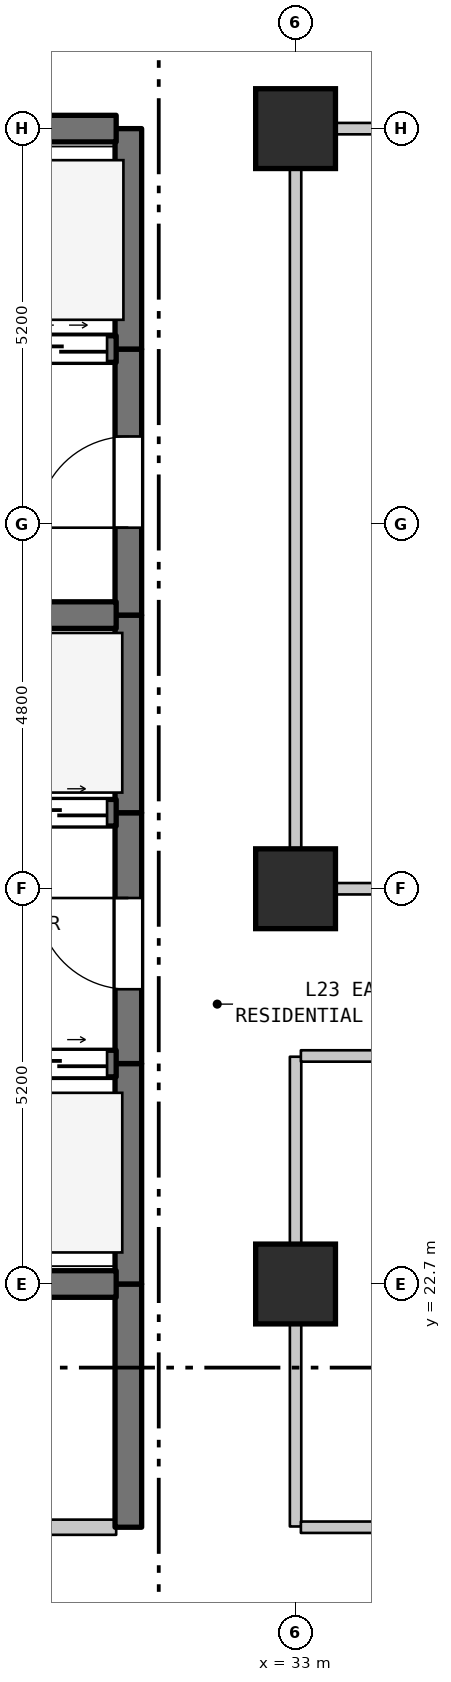
"""IFC4 building model, lengths in metres.
Left out: names, types, materials, properties, quantities, classifications, styles, units other than length and angle.
Written with IfcOpenShell. Run it as: python <this file> out.ifc"""

import sys

from ifc_helpers import new_model, si_unit, direction, frame, frame_2d, origin, origin_2d, place, context, subcontext, project, spatial, rectangle, extrude, element, fill, save


model = new_model("IFC4")
c1 = context("Model", 3, precision=1e-05, world=origin(), true_north=direction((0.0, 1.0)))
c2 = subcontext(c1, "Body", "Model", "MODEL_VIEW")
j1 = project(units=[si_unit("LENGTHUNIT", "METRE"), si_unit("PLANEANGLEUNIT", "RADIAN")], contexts=[c1])
p1 = place(None, origin())
s1 = spatial("IfcSite", under=j1, at=p1, CompositionType="ELEMENT")
p2 = place(p1, origin())
s2 = spatial("IfcBuilding", under=s1, at=p2, CompositionType="ELEMENT")
p3 = place(p2, frame((0.0, 0.0, 98.3)))
s3 = spatial("IfcBuildingStorey", under=s2, at=p3, CompositionType="ELEMENT", Elevation=98.3)
for number, where, z_axis, x_axis in (
    (1, (33.0, 22.7, 0.0), (0.0, 0.0, 1.0), (1.0, 0.0, 0.0)),
    (2, (33.0, 27.9, 0.0), (0.0, 0.0, 1.0), (1.0, 0.0, 0.0)),
    (3, (33.0, 37.9, 0.0), (0.0, 0.0, 1.0), (1.0, 0.0, 0.0)),
):
    element("IfcColumn", number, at=place(p3, frame(where, z_axis=z_axis, x_axis=x_axis)), inside=s3, PredefinedType="COLUMN", context=c2, shape_type="SweptSolid", body=[
        extrude(rectangle(XDim=1.05, YDim=1.05, at=origin_2d()), origin(), (0.0, 0.0, 1.0), 3.7),
    ])
p4 = place(p3, frame((30.8, 19.5, 0.0), z_axis=(0.0, 0.0, 1.0), x_axis=(0.0, 1.0, 0.0)))
e4 = element("IfcWall", 4, at=p4, inside=s3, PredefinedType="SHEAR", context=c2, shape_type="SweptSolid", body=[
    extrude(rectangle(XDim=3.2, YDim=0.35, at=frame_2d((1.6, 0.0))), origin(), (0.0, 0.0, 1.0), 3.385),
])
p5 = place(p3, frame((30.8, 22.7, 0.0), z_axis=(0.0, 0.0, 1.0), x_axis=(0.0, 1.0, 0.0)))
e5 = element("IfcWall", 5, at=p5, inside=s3, PredefinedType="SHEAR", context=c2, shape_type="SweptSolid", body=[
    extrude(rectangle(XDim=2.9, YDim=0.35, at=frame_2d((1.45, 0.0))), origin(), (0.0, 0.0, 1.0), 3.385),
])
p6 = place(p3, frame((30.8, 25.6, 0.0), z_axis=(0.0, 0.0, 1.0), x_axis=(0.0, 1.0, 0.0)))
e6 = element("IfcWall", 6, at=p6, inside=s3, PredefinedType="SHEAR", context=c2, shape_type="SweptSolid", body=[
    extrude(rectangle(XDim=3.3, YDim=0.35, at=frame_2d((1.65, 0.0))), origin(), (0.0, 0.0, 1.0), 3.385),
])
p7 = place(p6, frame((0.978, 0.0, 0.0)))
e7 = element("IfcOpeningElement", 7, at=p7, cuts=e6, PredefinedType="OPENING", context=c2, shape_type="SweptSolid", body=[
    extrude(rectangle(XDim=1.2, YDim=2.2, at=frame_2d((0.6, 1.1))), frame((0.0, 0.185, 0.0), z_axis=(0.0, -1.0, 0.0), x_axis=(1.0, 0.0, 0.0)), (0.0, 0.0, 1.0), 0.37),
])
p8 = place(p3, frame((30.8, 28.9, 0.0), z_axis=(0.0, 0.0, 1.0), x_axis=(0.0, 1.0, 0.0)))
e8 = element("IfcWall", 8, at=p8, inside=s3, PredefinedType="SHEAR", context=c2, shape_type="SweptSolid", body=[
    extrude(rectangle(XDim=2.6, YDim=0.35, at=frame_2d((1.3, 0.0))), origin(), (0.0, 0.0, 1.0), 3.385),
])
p9 = place(p3, frame((30.8, 31.5, 0.0), z_axis=(0.0, 0.0, 1.0), x_axis=(0.0, 1.0, 0.0)))
e9 = element("IfcWall", 9, at=p9, inside=s3, PredefinedType="SHEAR", context=c2, shape_type="SweptSolid", body=[
    extrude(rectangle(XDim=3.5, YDim=0.35, at=frame_2d((1.75, 0.0))), origin(), (0.0, 0.0, 1.0), 3.385),
])
p10 = place(p9, frame((1.15, 0.0, 0.0)))
e10 = element("IfcOpeningElement", 10, at=p10, cuts=e9, PredefinedType="OPENING", context=c2, shape_type="SweptSolid", body=[
    extrude(rectangle(XDim=1.2, YDim=2.2, at=frame_2d((0.6, 1.1))), frame((0.0, 0.185, 0.0), z_axis=(0.0, -1.0, 0.0), x_axis=(1.0, 0.0, 0.0)), (0.0, 0.0, 1.0), 0.37),
])
p11 = place(p3, frame((30.8, 35.0, 0.0), z_axis=(0.0, 0.0, 1.0), x_axis=(0.0, 1.0, 0.0)))
e11 = element("IfcWall", 11, at=p11, inside=s3, PredefinedType="SHEAR", context=c2, shape_type="SweptSolid", body=[
    extrude(rectangle(XDim=2.9, YDim=0.35, at=frame_2d((1.45, 0.0))), origin(), (0.0, 0.0, 1.0), 3.385),
])
p12 = place(p3, frame((33.0, 19.51, 0.0), z_axis=(0.0, 0.0, 1.0), x_axis=(0.0, 1.0, 0.0)))
e12 = element("IfcWall", 12, at=p12, inside=s3, PredefinedType="STANDARD", context=c2, shape_type="SweptSolid", body=[
    extrude(rectangle(XDim=6.18, YDim=0.15, at=frame_2d((3.09, 0.0))), origin(), (0.0, 0.0, 1.0), 2.935),
])
p13 = place(p3, frame((33.0, 27.91, 0.0), z_axis=(0.0, 0.0, 1.0), x_axis=(0.0, 1.0, 0.0)))
e13 = element("IfcWall", 13, at=p13, inside=s3, PredefinedType="STANDARD", context=c2, shape_type="SweptSolid", body=[
    extrude(rectangle(XDim=9.98, YDim=0.15, at=frame_2d((4.99, 0.0))), origin(), (0.0, 0.0, 1.0), 2.885),
])
p14 = place(p3, frame((25.985, 19.5, 0.0), z_axis=(0.0, 0.0, 1.0), x_axis=(1.0, 0.0, 0.0)))
e14 = element("IfcWall", 14, at=p14, inside=s3, PredefinedType="STANDARD", context=c2, shape_type="SweptSolid", body=[
    extrude(rectangle(XDim=4.655, YDim=0.2, at=frame_2d((2.327, 0.0))), origin(), (0.0, 0.0, 1.0), 3.385),
])
p15 = place(p14, frame((1.845, 0.0, 0.0)))
e15 = element("IfcOpeningElement", 15, at=p15, cuts=e14, PredefinedType="OPENING", context=c2, shape_type="SweptSolid", body=[
    extrude(rectangle(XDim=0.9, YDim=2.15, at=frame_2d((0.45, 1.075))), frame((0.0, 0.11, 0.0), z_axis=(0.0, -1.0, 0.0), x_axis=(1.0, 0.0, 0.0)), (0.0, 0.0, 1.0), 0.22),
])
p16 = place(p3, frame((33.07, 19.5, 0.0), z_axis=(0.0, 0.0, 1.0), x_axis=(1.0, 0.0, 0.0)))
e16 = element("IfcWall", 16, at=p16, inside=s3, PredefinedType="STANDARD", context=c2, shape_type="SweptSolid", body=[
    extrude(rectangle(XDim=21.51, YDim=0.15, at=frame_2d((10.755, 0.0))), origin(), (0.0, 0.0, 1.0), 3.385),
])
p17 = place(p3, frame((27.46, 22.7, 0.0), z_axis=(0.0, 0.0, 1.0), x_axis=(1.0, 0.0, 0.0)))
e17 = element("IfcWall", 17, at=p17, inside=s3, PredefinedType="SHEAR", context=c2, shape_type="SweptSolid", body=[
    extrude(rectangle(XDim=3.18, YDim=0.35, at=frame_2d((1.59, 0.0))), origin(), (0.0, 0.0, 1.0), 3.385),
])
p18 = place(p3, frame((27.46, 25.6, 0.0), z_axis=(0.0, 0.0, 1.0), x_axis=(1.0, 0.0, 0.0)))
e18 = element("IfcWall", 18, at=p18, inside=s3, PredefinedType="SHEAR", context=c2, shape_type="SweptSolid", body=[
    extrude(rectangle(XDim=3.18, YDim=0.35, at=frame_2d((1.59, 0.0))), origin(), (0.0, 0.0, 1.0), 3.385),
])
p19 = place(p18, frame((0.12, 0.0, 0.0)))
e19 = element("IfcOpeningElement", 19, at=p19, cuts=e18, PredefinedType="OPENING", context=c2, shape_type="SweptSolid", body=[
    extrude(rectangle(XDim=1.25, YDim=2.2, at=frame_2d((0.625, 1.1))), frame((0.0, 0.185, 0.0), z_axis=(0.0, -1.0, 0.0), x_axis=(1.0, 0.0, 0.0)), (0.0, 0.0, 1.0), 0.37),
])
p20 = place(p18, frame((1.81, 0.0, 0.0)))
e20 = element("IfcOpeningElement", 20, at=p20, cuts=e18, PredefinedType="OPENING", context=c2, shape_type="SweptSolid", body=[
    extrude(rectangle(XDim=1.25, YDim=2.2, at=frame_2d((0.625, 1.1))), frame((0.0, 0.185, 0.0), z_axis=(0.0, -1.0, 0.0), x_axis=(1.0, 0.0, 0.0)), (0.0, 0.0, 1.0), 0.37),
])
p21 = place(p3, frame((33.07, 25.7, 0.0), z_axis=(0.0, 0.0, 1.0), x_axis=(1.0, 0.0, 0.0)))
e21 = element("IfcWall", 21, at=p21, inside=s3, PredefinedType="STANDARD", context=c2, shape_type="SweptSolid", body=[
    extrude(rectangle(XDim=21.51, YDim=0.15, at=frame_2d((10.755, 0.0))), origin(), (0.0, 0.0, 1.0), 3.385),
])
p22 = place(p3, frame((33.07, 27.9, 0.0), z_axis=(0.0, 0.0, 1.0), x_axis=(1.0, 0.0, 0.0)))
e22 = element("IfcWall", 22, at=p22, inside=s3, PredefinedType="STANDARD", context=c2, shape_type="SweptSolid", body=[
    extrude(rectangle(XDim=11.93, YDim=0.15, at=frame_2d((5.965, 0.0))), origin(), (0.0, 0.0, 1.0), 2.885),
])
p23 = place(p22, frame((10.185, 0.0, 0.0)))
e23 = element("IfcOpeningElement", 23, at=p23, cuts=e22, PredefinedType="OPENING", context=c2, shape_type="SweptSolid", body=[
    extrude(rectangle(XDim=1.0, YDim=2.15, at=frame_2d((0.5, 1.075))), frame((0.0, 0.085, 0.0), z_axis=(0.0, -1.0, 0.0), x_axis=(1.0, 0.0, 0.0)), (0.0, 0.0, 1.0), 0.17),
])
p24 = place(p3, frame((27.46, 28.9, 0.0), z_axis=(0.0, 0.0, 1.0), x_axis=(1.0, 0.0, 0.0)))
e24 = element("IfcWall", 24, at=p24, inside=s3, PredefinedType="SHEAR", context=c2, shape_type="SweptSolid", body=[
    extrude(rectangle(XDim=3.18, YDim=0.35, at=frame_2d((1.59, 0.0))), origin(), (0.0, 0.0, 1.0), 3.385),
])
p25 = place(p24, frame((0.12, 0.0, 0.0)))
e25 = element("IfcOpeningElement", 25, at=p25, cuts=e24, PredefinedType="OPENING", context=c2, shape_type="SweptSolid", body=[
    extrude(rectangle(XDim=1.25, YDim=2.2, at=frame_2d((0.625, 1.1))), frame((0.0, 0.185, 0.0), z_axis=(0.0, -1.0, 0.0), x_axis=(1.0, 0.0, 0.0)), (0.0, 0.0, 1.0), 0.37),
])
p26 = place(p24, frame((1.81, 0.0, 0.0)))
e26 = element("IfcOpeningElement", 26, at=p26, cuts=e24, PredefinedType="OPENING", context=c2, shape_type="SweptSolid", body=[
    extrude(rectangle(XDim=1.25, YDim=2.2, at=frame_2d((0.625, 1.1))), frame((0.0, 0.185, 0.0), z_axis=(0.0, -1.0, 0.0), x_axis=(1.0, 0.0, 0.0)), (0.0, 0.0, 1.0), 0.37),
])
p27 = place(p3, frame((27.46, 31.5, 0.0), z_axis=(0.0, 0.0, 1.0), x_axis=(1.0, 0.0, 0.0)))
e27 = element("IfcWall", 27, at=p27, inside=s3, PredefinedType="SHEAR", context=c2, shape_type="SweptSolid", body=[
    extrude(rectangle(XDim=3.18, YDim=0.35, at=frame_2d((1.59, 0.0))), origin(), (0.0, 0.0, 1.0), 3.385),
])
p28 = place(p3, frame((19.16, 35.0, 0.0), z_axis=(0.0, 0.0, 1.0), x_axis=(1.0, 0.0, 0.0)))
e28 = element("IfcWall", 28, at=p28, inside=s3, PredefinedType="SHEAR", context=c2, shape_type="SweptSolid", body=[
    extrude(rectangle(XDim=11.48, YDim=0.35, at=frame_2d((5.74, 0.0))), origin(), (0.0, 0.0, 1.0), 3.385),
])
p29 = place(p28, frame((0.365, 0.0, 0.0)))
e29 = element("IfcOpeningElement", 29, at=p29, cuts=e28, PredefinedType="OPENING", context=c2, shape_type="SweptSolid", body=[
    extrude(rectangle(XDim=1.35, YDim=2.2, at=frame_2d((0.675, 1.1))), frame((0.0, 0.185, 0.0), z_axis=(0.0, -1.0, 0.0), x_axis=(1.0, 0.0, 0.0)), (0.0, 0.0, 1.0), 0.37),
])
p30 = place(p28, frame((2.765, 0.0, 0.0)))
e30 = element("IfcOpeningElement", 30, at=p30, cuts=e28, PredefinedType="OPENING", context=c2, shape_type="SweptSolid", body=[
    extrude(rectangle(XDim=1.35, YDim=2.2, at=frame_2d((0.675, 1.1))), frame((0.0, 0.185, 0.0), z_axis=(0.0, -1.0, 0.0), x_axis=(1.0, 0.0, 0.0)), (0.0, 0.0, 1.0), 0.37),
])
p31 = place(p28, frame((4.915, 0.0, 0.0)))
e31 = element("IfcOpeningElement", 31, at=p31, cuts=e28, PredefinedType="OPENING", context=c2, shape_type="SweptSolid", body=[
    extrude(rectangle(XDim=1.2, YDim=2.2, at=frame_2d((0.6, 1.1))), frame((0.0, 0.185, 0.0), z_axis=(0.0, -1.0, 0.0), x_axis=(1.0, 0.0, 0.0)), (0.0, 0.0, 1.0), 0.37),
])
p32 = place(p28, frame((6.665, 0.0, 0.0)))
e32 = element("IfcOpeningElement", 32, at=p32, cuts=e28, PredefinedType="OPENING", context=c2, shape_type="SweptSolid", body=[
    extrude(rectangle(XDim=1.2, YDim=2.2, at=frame_2d((0.6, 1.1))), frame((0.0, 0.185, 0.0), z_axis=(0.0, -1.0, 0.0), x_axis=(1.0, 0.0, 0.0)), (0.0, 0.0, 1.0), 0.37),
])
p33 = place(p28, frame((8.415, 0.0, 0.0)))
e33 = element("IfcOpeningElement", 33, at=p33, cuts=e28, PredefinedType="OPENING", context=c2, shape_type="SweptSolid", body=[
    extrude(rectangle(XDim=1.2, YDim=2.2, at=frame_2d((0.6, 1.1))), frame((0.0, 0.185, 0.0), z_axis=(0.0, -1.0, 0.0), x_axis=(1.0, 0.0, 0.0)), (0.0, 0.0, 1.0), 0.37),
])
p34 = place(p28, frame((10.16, 0.0, 0.0)))
e34 = element("IfcOpeningElement", 34, at=p34, cuts=e28, PredefinedType="OPENING", context=c2, shape_type="SweptSolid", body=[
    extrude(rectangle(XDim=1.2, YDim=2.2, at=frame_2d((0.6, 1.1))), frame((0.0, 0.185, 0.0), z_axis=(0.0, -1.0, 0.0), x_axis=(1.0, 0.0, 0.0)), (0.0, 0.0, 1.0), 0.37),
])
p35 = place(p3, frame((19.16, 37.9, 0.0), z_axis=(0.0, 0.0, 1.0), x_axis=(1.0, 0.0, 0.0)))
e35 = element("IfcWall", 35, at=p35, inside=s3, PredefinedType="SHEAR", context=c2, shape_type="SweptSolid", body=[
    extrude(rectangle(XDim=11.48, YDim=0.35, at=frame_2d((5.74, 0.0))), origin(), (0.0, 0.0, 1.0), 3.385),
])
p36 = place(p3, frame((33.07, 37.9, 0.0), z_axis=(0.0, 0.0, 1.0), x_axis=(1.0, 0.0, 0.0)))
e36 = element("IfcWall", 36, at=p36, inside=s3, PredefinedType="STANDARD", context=c2, shape_type="SweptSolid", body=[
    extrude(rectangle(XDim=26.935, YDim=0.15, at=frame_2d((13.467, 0.0))), origin(), (0.0, 0.0, 1.0), 3.385),
])
p37 = place(p36, frame((12.96, 0.0, 0.0)))
e37 = element("IfcOpeningElement", 37, at=p37, cuts=e36, PredefinedType="OPENING", context=c2, shape_type="SweptSolid", body=[
    extrude(rectangle(XDim=1.0, YDim=2.15, at=frame_2d((0.5, 1.075))), frame((0.0, 0.085, 0.0), z_axis=(0.0, -1.0, 0.0), x_axis=(1.0, 0.0, 0.0)), (0.0, 0.0, 1.0), 0.17),
])
p38 = place(p7, origin())
e38 = element("IfcDoor", 38, at=p38, inside=s3, OperationType="SINGLE_SWING_RIGHT", PredefinedType="DOOR", context=c2, shape_type="SweptSolid", body=[
    extrude(rectangle(XDim=1.2, YDim=2.2, at=frame_2d((0.6, 1.1))), frame((0.0, 0.025, 0.0), z_axis=(0.0, -1.0, 0.0), x_axis=(1.0, 0.0, 0.0)), (0.0, 0.0, 1.0), 0.05),
])
fill(e7, e38)
p39 = place(p10, origin())
e39 = element("IfcDoor", 39, at=p39, inside=s3, OperationType="SINGLE_SWING_LEFT", PredefinedType="DOOR", context=c2, shape_type="SweptSolid", body=[
    extrude(rectangle(XDim=1.2, YDim=2.2, at=frame_2d((0.6, 1.1))), frame((0.0, 0.025, 0.0), z_axis=(0.0, -1.0, 0.0), x_axis=(1.0, 0.0, 0.0)), (0.0, 0.0, 1.0), 0.05),
])
fill(e10, e39)
p40 = place(p20, origin())
e40 = element("IfcDoor", 40, at=p40, inside=s3, OperationType="DOUBLE_DOOR_SLIDING", PredefinedType="DOOR", context=c2, shape_type="SweptSolid", body=[
    extrude(rectangle(XDim=1.25, YDim=2.2, at=frame_2d((0.625, 1.1))), frame((0.0, 0.025, 0.0), z_axis=(0.0, -1.0, 0.0), x_axis=(1.0, 0.0, 0.0)), (0.0, 0.0, 1.0), 0.05),
])
fill(e20, e40)
p41 = place(p26, origin())
e41 = element("IfcDoor", 41, at=p41, inside=s3, OperationType="DOUBLE_DOOR_SLIDING", PredefinedType="DOOR", context=c2, shape_type="SweptSolid", body=[
    extrude(rectangle(XDim=1.25, YDim=2.2, at=frame_2d((0.625, 1.1))), frame((0.0, 0.025, 0.0), z_axis=(0.0, -1.0, 0.0), x_axis=(1.0, 0.0, 0.0)), (0.0, 0.0, 1.0), 0.05),
])
fill(e26, e41)
p42 = place(p34, origin())
e42 = element("IfcDoor", 42, at=p42, inside=s3, OperationType="DOUBLE_DOOR_SLIDING", PredefinedType="DOOR", context=c2, shape_type="SweptSolid", body=[
    extrude(rectangle(XDim=1.2, YDim=2.2, at=frame_2d((0.6, 1.1))), frame((0.0, 0.025, 0.0), z_axis=(0.0, -1.0, 0.0), x_axis=(1.0, 0.0, 0.0)), (0.0, 0.0, 1.0), 0.05),
])
fill(e34, e42)
save(model, sys.argv[1])
